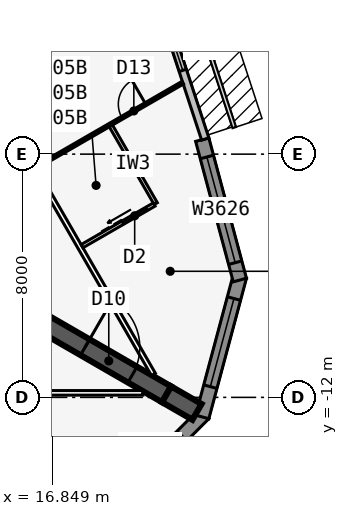
"""IFC4 building model, lengths in metres.
Left out: names, types, materials, properties, quantities, classifications, styles, units other than length and angle.
Written with IfcOpenShell. Run it as: python <this file> out.ifc"""

import sys

from ifc_helpers import new_model, si_unit, direction, frame, frame_2d, origin, place, context, subcontext, project, spatial, polyline, rectangle, outline, extrude, element, fill, save


model = new_model("IFC4")
c1 = context("Model", 3, precision=1e-05, world=origin(), true_north=direction((0.0, 1.0)))
c2 = subcontext(c1, "Body", "Model", "MODEL_VIEW")
j1 = project(units=[si_unit("LENGTHUNIT", "METRE"), si_unit("PLANEANGLEUNIT", "RADIAN")], contexts=[c1])
p1 = place(None, origin())
s1 = spatial("IfcSite", under=j1, at=p1, CompositionType="ELEMENT")
p2 = place(p1, origin())
s2 = spatial("IfcBuilding", under=s1, at=p2, CompositionType="ELEMENT")
p3 = place(p2, frame((0.0, 0.0, 260.9)))
s3 = spatial("IfcBuildingStorey", under=s2, at=p3, CompositionType="ELEMENT", Elevation=260.9)
p4 = place(p3, frame((16.5, -9.526, 0.0), z_axis=(0.0, 0.0, 1.0), x_axis=(0.866031398331, -0.499989616998, 0.0)))
e1 = element("IfcWall", 1, at=p4, inside=s3, PredefinedType="SHEAR", context=c2, shape_type="SweptSolid", body=[
    extrude(rectangle(XDim=4.746, YDim=0.6, at=frame_2d((2.373, 0.0))), origin(), (0.0, 0.0, 1.0), 3.6),
])
p5 = place(p4, frame((1.65, 0.0, 0.0)))
e2 = element("IfcOpeningElement", 2, at=p5, cuts=e1, PredefinedType="OPENING", context=c2, shape_type="SweptSolid", body=[
    extrude(rectangle(XDim=1.8, YDim=2.13, at=frame_2d((0.9, 1.065))), frame((0.0, 0.31, 0.0), z_axis=(0.0, -1.0, 0.0), x_axis=(1.0, 0.0, 0.0)), (0.0, 0.0, 1.0), 0.62),
])
p6 = place(p3, frame((20.61, -11.899, 0.0), z_axis=(0.0, 0.0, 1.0), x_axis=(0.866009537788, -0.500027479704, 0.0)))
e3 = element("IfcWall", 3, at=p6, inside=s3, PredefinedType="SHEAR", context=c2, shape_type="SweptSolid", body=[
    extrude(rectangle(XDim=1.155, YDim=0.6, at=frame_2d((0.577, 0.0))), origin(), (0.0, 0.0, 1.0), 3.6),
])
p7 = place(p3, frame((18.46, -15.924, 0.0), z_axis=(0.0, 0.0, 1.0), x_axis=(0.707081252484, 0.707132308968, 0.0)))
e4 = element("IfcWall", 4, at=p7, inside=s3, PredefinedType="SOLIDWALL", context=c2, shape_type="SweptSolid", body=[
    extrude(outline(polyline([(4.782, 0.225), (4.723, 0.225), (4.375, 0.132), (4.351, 0.225), (0.0, 0.225), (0.0, -0.225), (4.782, -0.225), (4.782, 0.225)])), origin(), (0.0, 0.0, 1.0), 3.435),
])
p8 = place(p7, frame((0.75, 0.0, 0.45)))
e5 = element("IfcOpeningElement", 5, at=p8, cuts=e4, PredefinedType="OPENING", context=c2, shape_type="SweptSolid", body=[
    extrude(rectangle(XDim=3.0, YDim=2.6, at=frame_2d((1.5, 1.3))), frame((0.0, 0.235, 0.0), z_axis=(0.0, -1.0, 0.0), x_axis=(1.0, 0.0, 0.0)), (0.0, 0.0, 1.0), 0.47),
])
p9 = place(p3, frame((21.783, -12.644, 0.0), z_axis=(0.0, 0.0, 1.0), x_axis=(0.25880328844, 0.965930048136, 0.0)))
e6 = element("IfcWall", 6, at=p9, inside=s3, PredefinedType="SOLIDWALL", context=c2, shape_type="SweptSolid", body=[
    extrude(outline(polyline([(4.782, 0.225), (0.431, 0.225), (0.406, 0.132), (0.06, 0.225), (0.0, 0.225), (0.0, -0.225), (4.782, -0.225), (4.782, 0.225)])), origin(), (0.0, 0.0, 1.0), 3.435),
])
p10 = place(p9, frame((1.031, 0.0, 0.45)))
e7 = element("IfcOpeningElement", 7, at=p10, cuts=e6, PredefinedType="OPENING", context=c2, shape_type="SweptSolid", body=[
    extrude(rectangle(XDim=3.0, YDim=2.6, at=frame_2d((1.5, 1.3))), frame((0.0, 0.235, 0.0), z_axis=(0.0, -1.0, 0.0), x_axis=(1.0, 0.0, 0.0)), (0.0, 0.0, 1.0), 0.47),
])
p11 = place(p3, frame((23.02, -8.141, 0.0), z_axis=(0.0, 0.0, 1.0), x_axis=(-0.25880328844, 0.965930048136, 0.0)))
e8 = element("IfcWall", 8, at=p11, inside=s3, PredefinedType="SOLIDWALL", context=c2, shape_type="SweptSolid", body=[
    extrude(rectangle(XDim=4.782, YDim=0.45, at=frame_2d((2.391, 0.0))), origin(), (0.0, 0.0, 1.0), 3.435),
])
p12 = place(p11, frame((0.591, 0.0, 0.45)))
e9 = element("IfcOpeningElement", 9, at=p12, cuts=e8, PredefinedType="OPENING", context=c2, shape_type="SweptSolid", body=[
    extrude(rectangle(XDim=3.6, YDim=2.6, at=frame_2d((1.8, 1.3))), frame((0.0, 0.235, 0.0), z_axis=(0.0, -1.0, 0.0), x_axis=(1.0, 0.0, 0.0)), (0.0, 0.0, 1.0), 0.47),
])
p13 = place(p3, frame((21.881, -3.503, 0.0), z_axis=(0.0, 0.0, 1.0), x_axis=(-0.311328857048, 0.95030223759, 0.0)))
e10 = element("IfcWall", 10, at=p13, inside=s3, PredefinedType="STANDARD", context=c2, shape_type="SweptSolid", body=[
    extrude(rectangle(XDim=7.153, YDim=0.25, at=frame_2d((3.576, 0.0))), origin(), (0.0, 0.0, 1.0), 3.435),
])
p14 = place(p13, frame((2.376, 0.0, 0.45)))
e11 = element("IfcOpeningElement", 11, at=p14, cuts=e10, PredefinedType="OPENING", context=c2, shape_type="SweptSolid", body=[
    extrude(rectangle(XDim=4.2, YDim=2.6, at=frame_2d((2.1, 1.3))), frame((0.0, 0.135, 0.0), z_axis=(0.0, -1.0, 0.0), x_axis=(1.0, 0.0, 0.0)), (0.0, 0.0, 1.0), 0.27),
])
p15 = place(p3, frame((-19.827, -11.851, 0.0), z_axis=(0.0, 0.0, 1.0), x_axis=(1.0, 0.0, 0.0)))
e12 = element("IfcWall", 12, at=p15, inside=s3, PredefinedType="PARTITIONING", context=c2, shape_type="SweptSolid", body=[
    extrude(rectangle(XDim=39.654, YDim=0.15, at=frame_2d((19.827, 0.0))), origin(), (0.0, 0.0, 1.0), 3.435),
])
p16 = place(p15, frame((3.272, 0.0, 0.0)))
e13 = element("IfcOpeningElement", 13, at=p16, cuts=e12, PredefinedType="OPENING", context=c2, shape_type="SweptSolid", body=[
    extrude(rectangle(XDim=0.95, YDim=2.13, at=frame_2d((0.475, 1.065))), frame((0.0, 0.085, 0.0), z_axis=(0.0, -1.0, 0.0), x_axis=(1.0, 0.0, 0.0)), (0.0, 0.0, 1.0), 0.17),
])
p17 = place(p15, frame((17.052, 0.0, 0.0)))
e14 = element("IfcOpeningElement", 14, at=p17, cuts=e12, PredefinedType="OPENING", context=c2, shape_type="SweptSolid", body=[
    extrude(rectangle(XDim=0.95, YDim=2.13, at=frame_2d((0.475, 1.065))), frame((0.0, 0.085, 0.0), z_axis=(0.0, -1.0, 0.0), x_axis=(1.0, 0.0, 0.0)), (0.0, 0.0, 1.0), 0.17),
])
p18 = place(p15, frame((23.052, 0.0, 0.0)))
e15 = element("IfcOpeningElement", 15, at=p18, cuts=e12, PredefinedType="OPENING", context=c2, shape_type="SweptSolid", body=[
    extrude(rectangle(XDim=0.95, YDim=2.13, at=frame_2d((0.475, 1.065))), frame((0.0, 0.085, 0.0), z_axis=(0.0, -1.0, 0.0), x_axis=(1.0, 0.0, 0.0)), (0.0, 0.0, 1.0), 0.17),
])
p19 = place(p15, frame((35.432, 0.0, 0.0)))
e16 = element("IfcOpeningElement", 16, at=p19, cuts=e12, PredefinedType="OPENING", context=c2, shape_type="SweptSolid", body=[
    extrude(rectangle(XDim=0.95, YDim=2.13, at=frame_2d((0.475, 1.065))), frame((0.0, 0.085, 0.0), z_axis=(0.0, -1.0, 0.0), x_axis=(1.0, 0.0, 0.0)), (0.0, 0.0, 1.0), 0.17),
])
p20 = place(p3, frame((20.177, -11.245, 0.0), z_axis=(0.0, 0.0, 1.0), x_axis=(-0.499998875317, 0.866026053119, 0.0)))
e17 = element("IfcWall", 17, at=p20, inside=s3, PredefinedType="PARTITIONING", context=c2, shape_type="SweptSolid", body=[
    extrude(rectangle(XDim=39.654, YDim=0.15, at=frame_2d((19.827, 0.0))), origin(), (0.0, 0.0, 1.0), 3.435),
])
p21 = place(p20, frame((10.352, 0.0, 0.0)))
e18 = element("IfcOpeningElement", 18, at=p21, cuts=e17, PredefinedType="OPENING", context=c2, shape_type="SweptSolid", body=[
    extrude(rectangle(XDim=0.95, YDim=2.13, at=frame_2d((0.475, 1.065))), frame((0.0, 0.085, 0.0), z_axis=(0.0, -1.0, 0.0), x_axis=(1.0, 0.0, 0.0)), (0.0, 0.0, 1.0), 0.17),
])
p22 = place(p3, frame((16.329, -4.429, 0.0), z_axis=(0.0, 0.0, 1.0), x_axis=(0.866029066823, 0.499993655377, 0.0)))
e19 = element("IfcWall", 19, at=p22, inside=s3, PredefinedType="PARTITIONING", context=c2, shape_type="SweptSolid", body=[
    extrude(rectangle(XDim=5.559, YDim=0.1, at=frame_2d((2.779, 0.0))), origin(), (0.0, 0.0, 1.0), 2.823),
])
p23 = place(p22, frame((3.25, 0.0, 0.0)))
e20 = element("IfcOpeningElement", 20, at=p23, cuts=e19, PredefinedType="OPENING", context=c2, shape_type="SweptSolid", body=[
    extrude(rectangle(XDim=0.9, YDim=2.13, at=frame_2d((0.45, 1.065))), frame((0.0, 0.06, 0.0), z_axis=(0.0, -1.0, 0.0), x_axis=(1.0, 0.0, 0.0)), (0.0, 0.0, 1.0), 0.12),
])
p24 = place(p3, frame((20.253, -5.627, 0.0), z_axis=(0.0, 0.0, 1.0), x_axis=(-0.50002537861, 0.866010750942, 0.0)))
e21 = element("IfcWall", 21, at=p24, inside=s3, PredefinedType="PLUMBINGWALL", context=c2, shape_type="SweptSolid", body=[
    extrude(rectangle(XDim=3.0, YDim=0.12, at=frame_2d((1.5, 0.0))), origin(), (0.0, 0.0, 1.0), 3.435),
])
p25 = place(p3, frame((17.829, -7.027, 0.0), z_axis=(0.0, 0.0, 1.0), x_axis=(0.866035715982, 0.499982138324, 0.0)))
e22 = element("IfcWall", 22, at=p25, inside=s3, PredefinedType="PLUMBINGWALL", context=c2, shape_type="SweptSolid", body=[
    extrude(rectangle(XDim=2.74, YDim=0.12, at=frame_2d((1.37, 0.0))), origin(), (0.0, 0.0, 1.0), 3.435),
])
p26 = place(p25, frame((1.55, 0.0, 0.0)))
e23 = element("IfcOpeningElement", 23, at=p26, cuts=e22, PredefinedType="OPENING", context=c2, shape_type="SweptSolid", body=[
    extrude(rectangle(XDim=0.9, YDim=2.13, at=frame_2d((0.45, 1.065))), frame((0.0, 0.07, 0.0), z_axis=(0.0, -1.0, 0.0), x_axis=(1.0, 0.0, 0.0)), (0.0, 0.0, 1.0), 0.14),
])
p27 = place(p8, origin())
e24 = element("IfcWindow", 24, at=p27, inside=s3, PartitioningType="SINGLE_PANEL", PredefinedType="WINDOW", context=c2, shape_type="SweptSolid", body=[
    extrude(rectangle(XDim=3.0, YDim=2.6, at=frame_2d((1.5, 1.3))), frame((0.0, 0.03, 0.0), z_axis=(0.0, -1.0, 0.0), x_axis=(1.0, 0.0, 0.0)), (0.0, 0.0, 1.0), 0.06),
])
fill(e5, e24)
p28 = place(p10, origin())
e25 = element("IfcWindow", 25, at=p28, inside=s3, PartitioningType="SINGLE_PANEL", PredefinedType="WINDOW", context=c2, shape_type="SweptSolid", body=[
    extrude(rectangle(XDim=3.0, YDim=2.6, at=frame_2d((1.5, 1.3))), frame((0.0, 0.03, 0.0), z_axis=(0.0, -1.0, 0.0), x_axis=(1.0, 0.0, 0.0)), (0.0, 0.0, 1.0), 0.06),
])
fill(e7, e25)
p29 = place(p12, origin())
e26 = element("IfcWindow", 26, at=p29, inside=s3, PartitioningType="SINGLE_PANEL", PredefinedType="WINDOW", context=c2, shape_type="SweptSolid", body=[
    extrude(rectangle(XDim=3.6, YDim=2.6, at=frame_2d((1.8, 1.3))), frame((0.0, 0.03, 0.0), z_axis=(0.0, -1.0, 0.0), x_axis=(1.0, 0.0, 0.0)), (0.0, 0.0, 1.0), 0.06),
])
fill(e9, e26)
p30 = place(p14, origin())
e27 = element("IfcWindow", 27, at=p30, inside=s3, PartitioningType="SINGLE_PANEL", PredefinedType="WINDOW", context=c2, shape_type="SweptSolid", body=[
    extrude(rectangle(XDim=4.2, YDim=2.6, at=frame_2d((2.1, 1.3))), frame((0.0, 0.03, 0.0), z_axis=(0.0, -1.0, 0.0), x_axis=(1.0, 0.0, 0.0)), (0.0, 0.0, 1.0), 0.06),
])
fill(e11, e27)
p31 = place(p23, origin())
e28 = element("IfcDoor", 28, at=p31, inside=s3, OperationType="SINGLE_SWING_RIGHT", PredefinedType="DOOR", context=c2, shape_type="SweptSolid", body=[
    extrude(rectangle(XDim=0.9, YDim=2.13, at=frame_2d((0.45, 1.065))), frame((0.0, 0.025, 0.0), z_axis=(0.0, -1.0, 0.0), x_axis=(1.0, 0.0, 0.0)), (0.0, 0.0, 1.0), 0.05),
])
fill(e20, e28)
p32 = place(p26, origin())
e29 = element("IfcDoor", 29, at=p32, inside=s3, OperationType="SLIDING_TO_LEFT", PredefinedType="DOOR", context=c2, shape_type="SweptSolid", body=[
    extrude(rectangle(XDim=0.9, YDim=2.13, at=frame_2d((0.45, 1.065))), frame((0.0, 0.025, 0.0), z_axis=(0.0, -1.0, 0.0), x_axis=(1.0, 0.0, 0.0)), (0.0, 0.0, 1.0), 0.05),
])
fill(e23, e29)
p33 = place(p5, origin())
e30 = element("IfcDoor", 30, at=p33, inside=s3, OperationType="DOUBLE_DOOR_DOUBLE_SWING", PredefinedType="DOOR", context=c2, shape_type="SweptSolid", body=[
    extrude(rectangle(XDim=1.8, YDim=2.13, at=frame_2d((0.9, 1.065))), frame((0.0, 0.025, 0.0), z_axis=(0.0, -1.0, 0.0), x_axis=(1.0, 0.0, 0.0)), (0.0, 0.0, 1.0), 0.05),
])
fill(e2, e30)
save(model, sys.argv[1])
